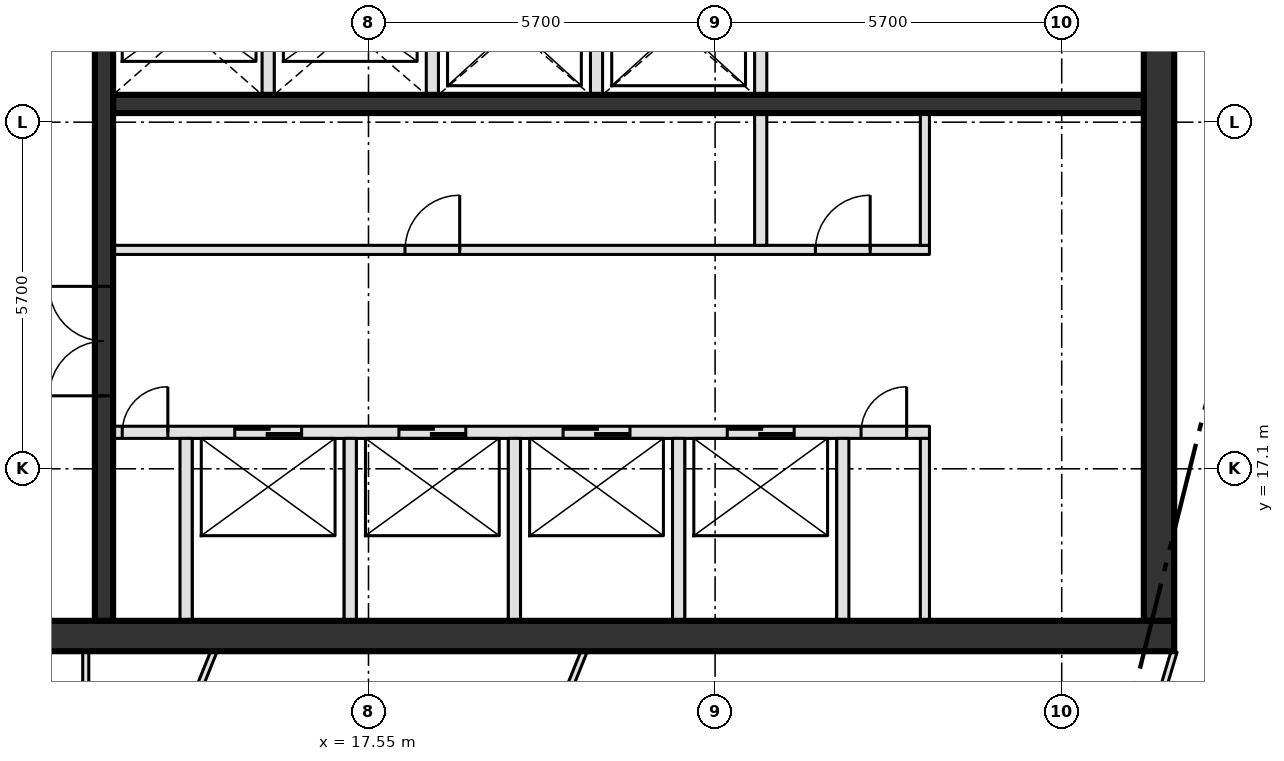
"""IFC4 building model, lengths in metres.
Left out: names, types, materials, properties, quantities, classifications, styles, units other than length and angle.
Written with IfcOpenShell. Run it as: python <this file> out.ifc"""

import sys

from ifc_helpers import new_model, si_unit, direction, frame, frame_2d, origin, place, context, subcontext, project, spatial, rectangle, extrude, element, fill, save


model = new_model("IFC4")
c1 = context("Model", 3, precision=1e-05, world=origin(), true_north=direction((0.0, 1.0)))
c2 = subcontext(c1, "Body", "Model", "MODEL_VIEW")
j1 = project(units=[si_unit("LENGTHUNIT", "METRE"), si_unit("PLANEANGLEUNIT", "RADIAN")], contexts=[c1])
p1 = place(None, origin())
s1 = spatial("IfcSite", under=j1, at=p1, CompositionType="ELEMENT")
p2 = place(p1, origin())
s2 = spatial("IfcBuilding", under=s1, at=p2, CompositionType="ELEMENT")
p3 = place(p2, frame((0.0, 0.0, 383.4)))
s3 = spatial("IfcBuildingStorey", under=s2, at=p3, CompositionType="ELEMENT", Elevation=383.4)
p4 = place(p3, frame((8.0, 14.35, -0.3), z_axis=(0.0, 0.0, 1.0), x_axis=(1.0, 0.0, 0.0)))
e1 = element("IfcWall", 1, at=p4, inside=s3, PredefinedType="SHEAR", context=c2, shape_type="SweptSolid", body=[
    extrude(rectangle(XDim=22.8, YDim=0.5, at=frame_2d((11.4, 0.0))), origin(), (0.0, 0.0, 1.0), 4.2),
])
p5 = place(p4, frame((2.3, 0.0, 0.3)))
e2 = element("IfcOpeningElement", 2, at=p5, cuts=e1, PredefinedType="OPENING", context=c2, shape_type="SweptSolid", body=[
    extrude(rectangle(XDim=1.8, YDim=2.1, at=frame_2d((0.9, 1.05))), frame((0.0, 0.26, 0.0), z_axis=(0.0, -1.0, 0.0), x_axis=(1.0, 0.0, 0.0)), (0.0, 0.0, 1.0), 0.52),
])
p6 = place(p3, frame((30.55, 14.6, -0.3), z_axis=(0.0, 0.0, 1.0), x_axis=(0.0, 1.0, 0.0)))
e3 = element("IfcWall", 3, at=p6, inside=s3, PredefinedType="SHEAR", context=c2, shape_type="SweptSolid", body=[
    extrude(rectangle(XDim=21.1, YDim=0.5, at=frame_2d((10.55, 0.0))), origin(), (0.0, 0.0, 1.0), 4.2),
])
p7 = place(p3, frame((13.35, 17.7, 0.0), z_axis=(0.0, 0.0, 1.0), x_axis=(1.0, 0.0, 0.0)))
e4 = element("IfcWall", 4, at=p7, inside=s3, PredefinedType="SOLIDWALL", context=c2, shape_type="SweptSolid", body=[
    extrude(rectangle(XDim=13.425, YDim=0.2, at=frame_2d((6.712, 0.0))), origin(), (0.0, 0.0, 1.0), 3.9),
])
p8 = place(p7, frame((2.0, 0.0, 0.0)))
e5 = element("IfcOpeningElement", 5, at=p8, cuts=e4, PredefinedType="OPENING", context=c2, shape_type="SweptSolid", body=[
    extrude(rectangle(XDim=1.1, YDim=2.1, at=frame_2d((0.55, 1.05))), frame((0.0, 0.11, 0.0), z_axis=(0.0, -1.0, 0.0), x_axis=(1.0, 0.0, 0.0)), (0.0, 0.0, 1.0), 0.22),
])
p9 = place(p7, frame((4.7, 0.0, 0.0)))
e6 = element("IfcOpeningElement", 6, at=p9, cuts=e4, PredefinedType="OPENING", context=c2, shape_type="SweptSolid", body=[
    extrude(rectangle(XDim=1.1, YDim=2.1, at=frame_2d((0.55, 1.05))), frame((0.0, 0.11, 0.0), z_axis=(0.0, -1.0, 0.0), x_axis=(1.0, 0.0, 0.0)), (0.0, 0.0, 1.0), 0.22),
])
p10 = place(p7, frame((7.4, 0.0, 0.0)))
e7 = element("IfcOpeningElement", 7, at=p10, cuts=e4, PredefinedType="OPENING", context=c2, shape_type="SweptSolid", body=[
    extrude(rectangle(XDim=1.1, YDim=2.1, at=frame_2d((0.55, 1.05))), frame((0.0, 0.11, 0.0), z_axis=(0.0, -1.0, 0.0), x_axis=(1.0, 0.0, 0.0)), (0.0, 0.0, 1.0), 0.22),
])
p11 = place(p7, frame((10.1, 0.0, 0.0)))
e8 = element("IfcOpeningElement", 8, at=p11, cuts=e4, PredefinedType="OPENING", context=c2, shape_type="SweptSolid", body=[
    extrude(rectangle(XDim=1.1, YDim=2.1, at=frame_2d((0.55, 1.05))), frame((0.0, 0.11, 0.0), z_axis=(0.0, -1.0, 0.0), x_axis=(1.0, 0.0, 0.0)), (0.0, 0.0, 1.0), 0.22),
])
p12 = place(p7, frame((0.15, 0.0, 0.0)))
e9 = element("IfcOpeningElement", 9, at=p12, cuts=e4, PredefinedType="OPENING", context=c2, shape_type="SweptSolid", body=[
    extrude(rectangle(XDim=0.75, YDim=2.1, at=frame_2d((0.375, 1.05))), frame((0.0, 0.11, 0.0), z_axis=(0.0, -1.0, 0.0), x_axis=(1.0, 0.0, 0.0)), (0.0, 0.0, 1.0), 0.22),
])
p13 = place(p7, frame((12.3, 0.0, 0.0)))
e10 = element("IfcOpeningElement", 10, at=p13, cuts=e4, PredefinedType="OPENING", context=c2, shape_type="SweptSolid", body=[
    extrude(rectangle(XDim=0.75, YDim=2.1, at=frame_2d((0.375, 1.05))), frame((0.0, 0.11, 0.0), z_axis=(0.0, -1.0, 0.0), x_axis=(1.0, 0.0, 0.0)), (0.0, 0.0, 1.0), 0.22),
])
p14 = place(p3, frame((13.35, 20.7, 0.0), z_axis=(0.0, 0.0, 1.0), x_axis=(1.0, 0.0, 0.0)))
e11 = element("IfcWall", 11, at=p14, inside=s3, PredefinedType="PARTITIONING", context=c2, shape_type="SweptSolid", body=[
    extrude(rectangle(XDim=13.425, YDim=0.15, at=frame_2d((6.712, 0.0))), origin(), (0.0, 0.0, 1.0), 3.9),
])
p15 = place(p14, frame((4.8, 0.0, 0.0)))
e12 = element("IfcOpeningElement", 12, at=p15, cuts=e11, PredefinedType="OPENING", context=c2, shape_type="SweptSolid", body=[
    extrude(rectangle(XDim=0.9, YDim=2.1, at=frame_2d((0.45, 1.05))), frame((0.0, 0.085, 0.0), z_axis=(0.0, -1.0, 0.0), x_axis=(1.0, 0.0, 0.0)), (0.0, 0.0, 1.0), 0.17),
])
p16 = place(p14, frame((11.55, 0.0, 0.0)))
e13 = element("IfcOpeningElement", 13, at=p16, cuts=e11, PredefinedType="OPENING", context=c2, shape_type="SweptSolid", body=[
    extrude(rectangle(XDim=0.9, YDim=2.1, at=frame_2d((0.45, 1.05))), frame((0.0, 0.085, 0.0), z_axis=(0.0, -1.0, 0.0), x_axis=(1.0, 0.0, 0.0)), (0.0, 0.0, 1.0), 0.17),
])
p17 = place(p3, frame((13.35, 23.1, 0.0), z_axis=(0.0, 0.0, 1.0), x_axis=(1.0, 0.0, 0.0)))
e14 = element("IfcWall", 14, at=p17, inside=s3, PredefinedType="SHEAR", context=c2, shape_type="SweptSolid", body=[
    extrude(rectangle(XDim=16.95, YDim=0.3, at=frame_2d((8.475, 0.0))), origin(), (0.0, 0.0, 1.0), 3.9),
])
p18 = place(p3, frame((13.2, 14.6, 0.0), z_axis=(0.0, 0.0, 1.0), x_axis=(0.0, 1.0, 0.0)))
e15 = element("IfcWall", 15, at=p18, inside=s3, PredefinedType="SHEAR", context=c2, shape_type="SweptSolid", body=[
    extrude(rectangle(XDim=21.1, YDim=0.3, at=frame_2d((10.55, 0.0))), origin(), (0.0, 0.0, 1.0), 3.9),
])
p19 = place(p18, frame((3.7, 0.0, 0.0)))
e16 = element("IfcOpeningElement", 16, at=p19, cuts=e15, PredefinedType="OPENING", context=c2, shape_type="SweptSolid", body=[
    extrude(rectangle(XDim=1.8, YDim=2.1, at=frame_2d((0.9, 1.05))), frame((0.0, 0.16, 0.0), z_axis=(0.0, -1.0, 0.0), x_axis=(1.0, 0.0, 0.0)), (0.0, 0.0, 1.0), 0.32),
])
p20 = place(p18, frame((11.8, 0.0, 0.0)))
e17 = element("IfcOpeningElement", 17, at=p20, cuts=e15, PredefinedType="OPENING", context=c2, shape_type="SweptSolid", body=[
    extrude(rectangle(XDim=1.2, YDim=2.1, at=frame_2d((0.6, 1.05))), frame((0.0, 0.16, 0.0), z_axis=(0.0, -1.0, 0.0), x_axis=(1.0, 0.0, 0.0)), (0.0, 0.0, 1.0), 0.32),
])
p21 = place(p3, frame((14.55, 14.6, 0.0), z_axis=(0.0, 0.0, 1.0), x_axis=(0.0, 1.0, 0.0)))
e18 = element("IfcWall", 18, at=p21, inside=s3, PredefinedType="SOLIDWALL", context=c2, shape_type="SweptSolid", body=[
    extrude(rectangle(XDim=3.0, YDim=0.2, at=frame_2d((1.5, 0.0))), origin(), (0.0, 0.0, 1.0), 3.9),
])
p22 = place(p3, frame((15.9, 23.25, 0.0), z_axis=(0.0, 0.0, 1.0), x_axis=(0.0, 1.0, 0.0)))
e19 = element("IfcWall", 19, at=p22, inside=s3, PredefinedType="SOLIDWALL", context=c2, shape_type="SweptSolid", body=[
    extrude(rectangle(XDim=2.15, YDim=0.2, at=frame_2d((1.075, 0.0))), origin(), (0.0, 0.0, 1.0), 3.9),
])
p23 = place(p3, frame((17.25, 14.6, 0.0), z_axis=(0.0, 0.0, 1.0), x_axis=(0.0, 1.0, 0.0)))
e20 = element("IfcWall", 20, at=p23, inside=s3, PredefinedType="SOLIDWALL", context=c2, shape_type="SweptSolid", body=[
    extrude(rectangle(XDim=3.0, YDim=0.2, at=frame_2d((1.5, 0.0))), origin(), (0.0, 0.0, 1.0), 3.9),
])
p24 = place(p3, frame((18.6, 23.25, 0.0), z_axis=(0.0, 0.0, 1.0), x_axis=(0.0, 1.0, 0.0)))
e21 = element("IfcWall", 21, at=p24, inside=s3, PredefinedType="SOLIDWALL", context=c2, shape_type="SweptSolid", body=[
    extrude(rectangle(XDim=5.15, YDim=0.2, at=frame_2d((2.575, 0.0))), origin(), (0.0, 0.0, 1.0), 3.9),
])
p25 = place(p24, frame((3.15, 0.0, 0.0)))
e22 = element("IfcOpeningElement", 22, at=p25, cuts=e21, PredefinedType="OPENING", context=c2, shape_type="SweptSolid", body=[
    extrude(rectangle(XDim=1.2, YDim=2.1, at=frame_2d((0.6, 1.05))), frame((0.0, 0.11, 0.0), z_axis=(0.0, -1.0, 0.0), x_axis=(1.0, 0.0, 0.0)), (0.0, 0.0, 1.0), 0.22),
])
p26 = place(p3, frame((19.95, 14.6, 0.0), z_axis=(0.0, 0.0, 1.0), x_axis=(0.0, 1.0, 0.0)))
e23 = element("IfcWall", 23, at=p26, inside=s3, PredefinedType="SOLIDWALL", context=c2, shape_type="SweptSolid", body=[
    extrude(rectangle(XDim=3.0, YDim=0.2, at=frame_2d((1.5, 0.0))), origin(), (0.0, 0.0, 1.0), 3.9),
])
p27 = place(p3, frame((21.3, 23.25, 0.0), z_axis=(0.0, 0.0, 1.0), x_axis=(0.0, 1.0, 0.0)))
e24 = element("IfcWall", 24, at=p27, inside=s3, PredefinedType="SOLIDWALL", context=c2, shape_type="SweptSolid", body=[
    extrude(rectangle(XDim=2.15, YDim=0.2, at=frame_2d((1.075, 0.0))), origin(), (0.0, 0.0, 1.0), 3.9),
])
p28 = place(p3, frame((22.65, 14.6, 0.0), z_axis=(0.0, 0.0, 1.0), x_axis=(0.0, 1.0, 0.0)))
e25 = element("IfcWall", 25, at=p28, inside=s3, PredefinedType="SOLIDWALL", context=c2, shape_type="SweptSolid", body=[
    extrude(rectangle(XDim=3.0, YDim=0.2, at=frame_2d((1.5, 0.0))), origin(), (0.0, 0.0, 1.0), 3.9),
])
p29 = place(p3, frame((24.0, 20.775, 0.0), z_axis=(0.0, 0.0, 1.0), x_axis=(0.0, 1.0, 0.0)))
e26 = element("IfcWall", 26, at=p29, inside=s3, PredefinedType="SOLIDWALL", context=c2, shape_type="SweptSolid", body=[
    extrude(rectangle(XDim=4.625, YDim=0.2, at=frame_2d((2.312, 0.0))), origin(), (0.0, 0.0, 1.0), 3.9),
])
p30 = place(p3, frame((25.35, 14.6, 0.0), z_axis=(0.0, 0.0, 1.0), x_axis=(0.0, 1.0, 0.0)))
e27 = element("IfcWall", 27, at=p30, inside=s3, PredefinedType="SOLIDWALL", context=c2, shape_type="SweptSolid", body=[
    extrude(rectangle(XDim=3.0, YDim=0.2, at=frame_2d((1.5, 0.0))), origin(), (0.0, 0.0, 1.0), 3.9),
])
p31 = place(p3, frame((26.7, 14.6, 0.0), z_axis=(0.0, 0.0, 1.0), x_axis=(0.0, 1.0, 0.0)))
e28 = element("IfcWall", 28, at=p31, inside=s3, PredefinedType="PARTITIONING", context=c2, shape_type="SweptSolid", body=[
    extrude(rectangle(XDim=3.0, YDim=0.15, at=frame_2d((1.5, 0.0))), origin(), (0.0, 0.0, 1.0), 3.9),
])
p32 = place(p3, frame((26.7, 20.775, 0.0), z_axis=(0.0, 0.0, 1.0), x_axis=(0.0, 1.0, 0.0)))
e29 = element("IfcWall", 29, at=p32, inside=s3, PredefinedType="PARTITIONING", context=c2, shape_type="SweptSolid", body=[
    extrude(rectangle(XDim=2.175, YDim=0.15, at=frame_2d((1.087, 0.0))), origin(), (0.0, 0.0, 1.0), 3.9),
])
p33 = place(p3, frame((12.9, 10.078, 0.0), z_axis=(0.0, 0.0, 1.0), x_axis=(0.0, 1.0, 0.0)))
e30 = element("IfcWall", 30, at=p33, inside=s3, PredefinedType="PARTITIONING", context=c2, shape_type="SweptSolid", body=[
    extrude(rectangle(XDim=4.022, YDim=0.1, at=frame_2d((2.011, 0.0))), origin(), (0.0, 0.0, 1.0), 3.9),
])
p34 = place(p3, frame((30.8, 14.1, 0.0), z_axis=(0.0, 0.0, 1.0), x_axis=(-0.286139929679, -0.958187842045, 0.0)))
e31 = element("IfcWall", 31, at=p34, inside=s3, PredefinedType="PARTITIONING", context=c2, shape_type="SweptSolid", body=[
    extrude(rectangle(XDim=8.717, YDim=0.1, at=frame_2d((4.358, 0.0))), origin(), (0.0, 0.0, 1.0), 3.9),
])
p35 = place(p34, frame((3.88, 0.0, 0.0)))
e32 = element("IfcOpeningElement", 32, at=p35, cuts=e31, PredefinedType="OPENING", context=c2, shape_type="SweptSolid", body=[
    extrude(rectangle(XDim=1.0, YDim=2.1, at=frame_2d((0.5, 1.05))), frame((0.0, 0.06, 0.0), z_axis=(0.0, -1.0, 0.0), x_axis=(1.0, 0.0, 0.0)), (0.0, 0.0, 1.0), 0.12),
])
p36 = place(p3, frame((13.183, 9.578, 0.0), z_axis=(0.0, 0.0, 1.0), x_axis=(0.374400970809, 0.927266904973, 0.0)))
e33 = element("IfcWall", 33, at=p36, inside=s3, PredefinedType="PARTITIONING", context=c2, shape_type="SweptSolid", body=[
    extrude(rectangle(XDim=4.877, YDim=0.1, at=frame_2d((2.438, 0.0))), origin(), (0.0, 0.0, 1.0), 3.9),
])
p37 = place(p3, frame((18.714, 8.199, 0.0), z_axis=(0.0, 0.0, 1.0), x_axis=(0.374418014388, 0.927260023133, 0.0)))
e34 = element("IfcWall", 34, at=p37, inside=s3, PredefinedType="PARTITIONING", context=c2, shape_type="SweptSolid", body=[
    extrude(rectangle(XDim=6.364, YDim=0.1, at=frame_2d((3.182, 0.0))), origin(), (0.0, 0.0, 1.0), 3.9),
])
p38 = place(p8, origin())
e35 = element("IfcDoor", 35, at=p38, inside=s3, OperationType="SLIDING_TO_LEFT", PredefinedType="DOOR", context=c2, shape_type="SweptSolid", body=[
    extrude(rectangle(XDim=1.1, YDim=2.1, at=frame_2d((0.55, 1.05))), frame((0.0, 0.025, 0.0), z_axis=(0.0, -1.0, 0.0), x_axis=(1.0, 0.0, 0.0)), (0.0, 0.0, 1.0), 0.05),
])
fill(e5, e35)
p39 = place(p9, origin())
e36 = element("IfcDoor", 36, at=p39, inside=s3, OperationType="SLIDING_TO_LEFT", PredefinedType="DOOR", context=c2, shape_type="SweptSolid", body=[
    extrude(rectangle(XDim=1.1, YDim=2.1, at=frame_2d((0.55, 1.05))), frame((0.0, 0.025, 0.0), z_axis=(0.0, -1.0, 0.0), x_axis=(1.0, 0.0, 0.0)), (0.0, 0.0, 1.0), 0.05),
])
fill(e6, e36)
p40 = place(p10, origin())
e37 = element("IfcDoor", 37, at=p40, inside=s3, OperationType="SLIDING_TO_LEFT", PredefinedType="DOOR", context=c2, shape_type="SweptSolid", body=[
    extrude(rectangle(XDim=1.1, YDim=2.1, at=frame_2d((0.55, 1.05))), frame((0.0, 0.025, 0.0), z_axis=(0.0, -1.0, 0.0), x_axis=(1.0, 0.0, 0.0)), (0.0, 0.0, 1.0), 0.05),
])
fill(e7, e37)
p41 = place(p11, origin())
e38 = element("IfcDoor", 38, at=p41, inside=s3, OperationType="SLIDING_TO_LEFT", PredefinedType="DOOR", context=c2, shape_type="SweptSolid", body=[
    extrude(rectangle(XDim=1.1, YDim=2.1, at=frame_2d((0.55, 1.05))), frame((0.0, 0.025, 0.0), z_axis=(0.0, -1.0, 0.0), x_axis=(1.0, 0.0, 0.0)), (0.0, 0.0, 1.0), 0.05),
])
fill(e8, e38)
p42 = place(p12, origin())
e39 = element("IfcDoor", 39, at=p42, inside=s3, OperationType="SINGLE_SWING_RIGHT", PredefinedType="DOOR", context=c2, shape_type="SweptSolid", body=[
    extrude(rectangle(XDim=0.75, YDim=2.1, at=frame_2d((0.375, 1.05))), frame((0.0, 0.025, 0.0), z_axis=(0.0, -1.0, 0.0), x_axis=(1.0, 0.0, 0.0)), (0.0, 0.0, 1.0), 0.05),
])
fill(e9, e39)
p43 = place(p13, origin())
e40 = element("IfcDoor", 40, at=p43, inside=s3, OperationType="SINGLE_SWING_RIGHT", PredefinedType="DOOR", context=c2, shape_type="SweptSolid", body=[
    extrude(rectangle(XDim=0.75, YDim=2.1, at=frame_2d((0.375, 1.05))), frame((0.0, 0.025, 0.0), z_axis=(0.0, -1.0, 0.0), x_axis=(1.0, 0.0, 0.0)), (0.0, 0.0, 1.0), 0.05),
])
fill(e10, e40)
p44 = place(p15, origin())
e41 = element("IfcDoor", 41, at=p44, inside=s3, OperationType="SINGLE_SWING_RIGHT", PredefinedType="DOOR", context=c2, shape_type="SweptSolid", body=[
    extrude(rectangle(XDim=0.9, YDim=2.1, at=frame_2d((0.45, 1.05))), frame((0.0, 0.025, 0.0), z_axis=(0.0, -1.0, 0.0), x_axis=(1.0, 0.0, 0.0)), (0.0, 0.0, 1.0), 0.05),
])
fill(e12, e41)
p45 = place(p16, origin())
e42 = element("IfcDoor", 42, at=p45, inside=s3, OperationType="SINGLE_SWING_RIGHT", PredefinedType="DOOR", context=c2, shape_type="SweptSolid", body=[
    extrude(rectangle(XDim=0.9, YDim=2.1, at=frame_2d((0.45, 1.05))), frame((0.0, 0.025, 0.0), z_axis=(0.0, -1.0, 0.0), x_axis=(1.0, 0.0, 0.0)), (0.0, 0.0, 1.0), 0.05),
])
fill(e13, e42)
p46 = place(p19, origin())
e43 = element("IfcDoor", 43, at=p46, inside=s3, OperationType="DOUBLE_DOOR_SINGLE_SWING", PredefinedType="DOOR", context=c2, shape_type="SweptSolid", body=[
    extrude(rectangle(XDim=1.8, YDim=2.1, at=frame_2d((0.9, 1.05))), frame((0.0, 0.025, 0.0), z_axis=(0.0, -1.0, 0.0), x_axis=(1.0, 0.0, 0.0)), (0.0, 0.0, 1.0), 0.05),
])
fill(e16, e43)
save(model, sys.argv[1])
